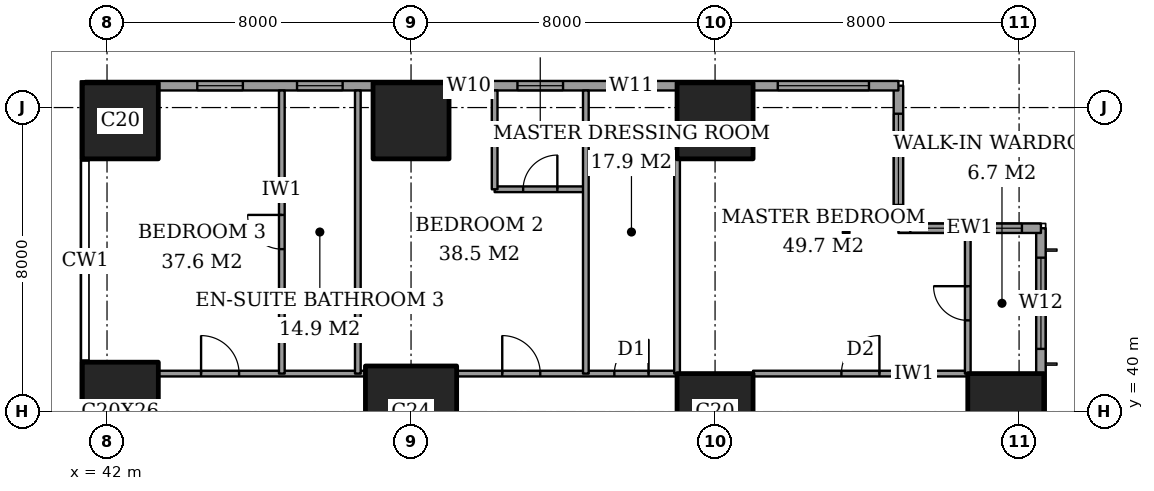
"""IFC4 building model, lengths in metres.
Left out: names, types, materials, properties, quantities, classifications, styles, units other than length and angle.
Written with IfcOpenShell. Run it as: python <this file> out.ifc"""

import sys

from ifc_helpers import new_model, si_unit, direction, frame, frame_2d, origin, origin_2d, place, context, subcontext, project, spatial, rectangle, extrude, element, fill, save


model = new_model("IFC4")
c1 = context("Model", 3, precision=1e-05, world=origin(), true_north=direction((0.0, 1.0)))
c2 = subcontext(c1, "Body", "Model", "MODEL_VIEW")
j1 = project(units=[si_unit("LENGTHUNIT", "METRE"), si_unit("PLANEANGLEUNIT", "RADIAN")], contexts=[c1])
p1 = place(None, origin())
s1 = spatial("IfcSite", under=j1, at=p1, CompositionType="ELEMENT")
p2 = place(p1, origin())
s2 = spatial("IfcBuilding", under=s1, at=p2, CompositionType="ELEMENT")
p3 = place(p2, frame((0.0, 0.0, 107.0)))
s3 = spatial("IfcBuildingStorey", under=s2, at=p3, CompositionType="ELEMENT", Elevation=107.0)
p4 = place(p3, frame((42.35, 40.0, 0.0), z_axis=(0.0, 0.0, 1.0), x_axis=(1.0, 0.0, 0.0)))
e1 = element("IfcColumn", 1, at=p4, inside=s3, PredefinedType="COLUMN", context=c2, shape_type="SweptSolid", body=[
    extrude(rectangle(XDim=2.0, YDim=2.6, at=origin_2d()), origin(), (0.0, 0.0, 1.0), 3.6),
])
p5 = place(p3, frame((42.35, 47.65, 0.0), z_axis=(0.0, 0.0, 1.0), x_axis=(1.0, 0.0, 0.0)))
e2 = element("IfcColumn", 2, at=p5, inside=s3, PredefinedType="COLUMN", context=c2, shape_type="SweptSolid", body=[
    extrude(rectangle(XDim=2.0, YDim=2.0, at=origin_2d()), origin(), (0.0, 0.0, 1.0), 3.6),
])
p6 = place(p3, frame((50.0, 40.0, 0.0), z_axis=(0.0, 0.0, 1.0), x_axis=(1.0, 0.0, 0.0)))
e3 = element("IfcColumn", 3, at=p6, inside=s3, PredefinedType="COLUMN", context=c2, shape_type="SweptSolid", body=[
    extrude(rectangle(XDim=2.4, YDim=2.4, at=origin_2d()), origin(), (0.0, 0.0, 1.0), 3.6),
])
for number, where, z_axis, x_axis in (
    (4, (50.0, 47.65, 0.0), (0.0, 0.0, 1.0), (1.0, 0.0, 0.0)),
    (5, (58.0, 40.0, 0.0), (0.0, 0.0, 1.0), (1.0, 0.0, 0.0)),
    (6, (58.0, 47.65, 0.0), (0.0, 0.0, 1.0), (1.0, 0.0, 0.0)),
    (7, (65.65, 40.0, 0.0), (0.0, 0.0, 1.0), (1.0, 0.0, 0.0)),
):
    element("IfcColumn", number, at=place(p3, frame(where, z_axis=z_axis, x_axis=x_axis)), inside=s3, PredefinedType="COLUMN", context=c2, shape_type="SweptSolid", body=[
        extrude(rectangle(XDim=2.0, YDim=2.0, at=origin_2d()), origin(), (0.0, 0.0, 1.0), 3.6),
    ])
p7 = place(p3, frame((66.575, 3.175, 0.0), z_axis=(0.0, 0.0, 1.0), x_axis=(0.0, 1.0, 0.0)))
e8 = element("IfcWall", 8, at=p7, inside=s3, PredefinedType="SOLIDWALL", context=c2, shape_type="SweptSolid", body=[
    extrude(rectangle(XDim=41.65, YDim=0.25, at=frame_2d((20.825, 0.0))), origin(), (0.0, 0.0, 1.0), 3.6),
])
p8 = place(p7, frame((0.775, 0.0, 0.4)))
e9 = element("IfcOpeningElement", 9, at=p8, cuts=e8, PredefinedType="OPENING", context=c2, shape_type="SweptSolid", body=[
    extrude(rectangle(XDim=2.4, YDim=2.2, at=frame_2d((1.2, 1.1))), frame((0.0, 0.135, 0.0), z_axis=(0.0, -1.0, 0.0), x_axis=(1.0, 0.0, 0.0)), (0.0, 0.0, 1.0), 0.27),
])
p9 = place(p7, frame((6.1, 0.0, 0.4)))
e10 = element("IfcOpeningElement", 10, at=p9, cuts=e8, PredefinedType="OPENING", context=c2, shape_type="SweptSolid", body=[
    extrude(rectangle(XDim=1.2, YDim=2.2, at=frame_2d((0.6, 1.1))), frame((0.0, 0.135, 0.0), z_axis=(0.0, -1.0, 0.0), x_axis=(1.0, 0.0, 0.0)), (0.0, 0.0, 1.0), 0.27),
])
p10 = place(p7, frame((8.275, 0.0, 0.4)))
e11 = element("IfcOpeningElement", 11, at=p10, cuts=e8, PredefinedType="OPENING", context=c2, shape_type="SweptSolid", body=[
    extrude(rectangle(XDim=2.4, YDim=2.2, at=frame_2d((1.2, 1.1))), frame((0.0, 0.135, 0.0), z_axis=(0.0, -1.0, 0.0), x_axis=(1.0, 0.0, 0.0)), (0.0, 0.0, 1.0), 0.27),
])
p11 = place(p7, frame((15.775, 0.0, 0.4)))
e12 = element("IfcOpeningElement", 12, at=p11, cuts=e8, PredefinedType="OPENING", context=c2, shape_type="SweptSolid", body=[
    extrude(rectangle(XDim=2.4, YDim=2.2, at=frame_2d((1.2, 1.1))), frame((0.0, 0.135, 0.0), z_axis=(0.0, -1.0, 0.0), x_axis=(1.0, 0.0, 0.0)), (0.0, 0.0, 1.0), 0.27),
])
p12 = place(p7, frame((23.475, 0.0, 0.4)))
e13 = element("IfcOpeningElement", 13, at=p12, cuts=e8, PredefinedType="OPENING", context=c2, shape_type="SweptSolid", body=[
    extrude(rectangle(XDim=2.4, YDim=2.2, at=frame_2d((1.2, 1.1))), frame((0.0, 0.135, 0.0), z_axis=(0.0, -1.0, 0.0), x_axis=(1.0, 0.0, 0.0)), (0.0, 0.0, 1.0), 0.27),
])
p13 = place(p7, frame((30.975, 0.0, 0.4)))
e14 = element("IfcOpeningElement", 14, at=p13, cuts=e8, PredefinedType="OPENING", context=c2, shape_type="SweptSolid", body=[
    extrude(rectangle(XDim=2.4, YDim=2.2, at=frame_2d((1.2, 1.1))), frame((0.0, 0.135, 0.0), z_axis=(0.0, -1.0, 0.0), x_axis=(1.0, 0.0, 0.0)), (0.0, 0.0, 1.0), 0.27),
])
p14 = place(p7, frame((34.5, 0.0, 0.4)))
e15 = element("IfcOpeningElement", 15, at=p14, cuts=e8, PredefinedType="OPENING", context=c2, shape_type="SweptSolid", body=[
    extrude(rectangle(XDim=1.2, YDim=2.2, at=frame_2d((0.6, 1.1))), frame((0.0, 0.135, 0.0), z_axis=(0.0, -1.0, 0.0), x_axis=(1.0, 0.0, 0.0)), (0.0, 0.0, 1.0), 0.27),
])
p15 = place(p7, frame((38.475, 0.0, 0.4)))
e16 = element("IfcOpeningElement", 16, at=p15, cuts=e8, PredefinedType="OPENING", context=c2, shape_type="SweptSolid", body=[
    extrude(rectangle(XDim=2.4, YDim=2.2, at=frame_2d((1.2, 1.1))), frame((0.0, 0.135, 0.0), z_axis=(0.0, -1.0, 0.0), x_axis=(1.0, 0.0, 0.0)), (0.0, 0.0, 1.0), 0.27),
])
p16 = place(p3, frame((66.575, 44.825, 0.0), z_axis=(0.0, 0.0, 1.0), x_axis=(-1.0, 0.0, 0.0)))
e17 = element("IfcWall", 17, at=p16, inside=s3, PredefinedType="SOLIDWALL", context=c2, shape_type="SweptSolid", body=[
    extrude(rectangle(XDim=3.75, YDim=0.25, at=frame_2d((1.875, 0.0))), origin(), (0.0, 0.0, 1.0), 3.6),
])
p17 = place(p16, frame((0.5, 0.0, 0.4)))
e18 = element("IfcOpeningElement", 18, at=p17, cuts=e17, PredefinedType="OPENING", context=c2, shape_type="SweptSolid", body=[
    extrude(rectangle(XDim=1.2, YDim=2.2, at=frame_2d((0.6, 1.1))), frame((0.0, 0.135, 0.0), z_axis=(0.0, -1.0, 0.0), x_axis=(1.0, 0.0, 0.0)), (0.0, 0.0, 1.0), 0.27),
])
p18 = place(p16, frame((2.238, 0.0, 0.4)))
e19 = element("IfcOpeningElement", 19, at=p18, cuts=e17, PredefinedType="OPENING", context=c2, shape_type="SweptSolid", body=[
    extrude(rectangle(XDim=1.2, YDim=2.2, at=frame_2d((0.6, 1.1))), frame((0.0, 0.135, 0.0), z_axis=(0.0, -1.0, 0.0), x_axis=(1.0, 0.0, 0.0)), (0.0, 0.0, 1.0), 0.27),
])
p19 = place(p3, frame((62.825, 44.825, 0.0), z_axis=(0.0, 0.0, 1.0), x_axis=(0.0, 1.0, 0.0)))
e20 = element("IfcWall", 20, at=p19, inside=s3, PredefinedType="SOLIDWALL", context=c2, shape_type="SweptSolid", body=[
    extrude(rectangle(XDim=3.75, YDim=0.25, at=frame_2d((1.875, 0.0))), origin(), (0.0, 0.0, 1.0), 3.6),
])
p20 = place(p19, frame((0.613, 0.0, 0.4)))
e21 = element("IfcOpeningElement", 21, at=p20, cuts=e20, PredefinedType="OPENING", context=c2, shape_type="SweptSolid", body=[
    extrude(rectangle(XDim=2.4, YDim=2.2, at=frame_2d((1.2, 1.1))), frame((0.0, 0.135, 0.0), z_axis=(0.0, -1.0, 0.0), x_axis=(1.0, 0.0, 0.0)), (0.0, 0.0, 1.0), 0.27),
])
p21 = place(p3, frame((62.825, 48.575, 0.0), z_axis=(0.0, 0.0, 1.0), x_axis=(-1.0, 0.0, 0.0)))
e22 = element("IfcWall", 22, at=p21, inside=s3, PredefinedType="SOLIDWALL", context=c2, shape_type="SweptSolid", body=[
    extrude(rectangle(XDim=21.4, YDim=0.25, at=frame_2d((10.7, 0.0))), origin(), (0.0, 0.0, 1.0), 3.6),
])
p22 = place(p21, frame((0.775, 0.0, 0.4)))
e23 = element("IfcOpeningElement", 23, at=p22, cuts=e22, PredefinedType="OPENING", context=c2, shape_type="SweptSolid", body=[
    extrude(rectangle(XDim=2.4, YDim=2.2, at=frame_2d((1.2, 1.1))), frame((0.0, 0.135, 0.0), z_axis=(0.0, -1.0, 0.0), x_axis=(1.0, 0.0, 0.0)), (0.0, 0.0, 1.0), 0.27),
])
p23 = place(p21, frame((6.425, 0.0, 0.4)))
e24 = element("IfcOpeningElement", 24, at=p23, cuts=e22, PredefinedType="OPENING", context=c2, shape_type="SweptSolid", body=[
    extrude(rectangle(XDim=1.2, YDim=2.2, at=frame_2d((0.6, 1.1))), frame((0.0, 0.135, 0.0), z_axis=(0.0, -1.0, 0.0), x_axis=(1.0, 0.0, 0.0)), (0.0, 0.0, 1.0), 0.27),
])
p24 = place(p21, frame((8.825, 0.0, 0.4)))
e25 = element("IfcOpeningElement", 25, at=p24, cuts=e22, PredefinedType="OPENING", context=c2, shape_type="SweptSolid", body=[
    extrude(rectangle(XDim=1.2, YDim=2.2, at=frame_2d((0.6, 1.1))), frame((0.0, 0.135, 0.0), z_axis=(0.0, -1.0, 0.0), x_axis=(1.0, 0.0, 0.0)), (0.0, 0.0, 1.0), 0.27),
])
p25 = place(p21, frame((11.0, 0.0, 0.4)))
e26 = element("IfcOpeningElement", 26, at=p25, cuts=e22, PredefinedType="OPENING", context=c2, shape_type="SweptSolid", body=[
    extrude(rectangle(XDim=0.6, YDim=2.2, at=frame_2d((0.3, 1.1))), frame((0.0, 0.135, 0.0), z_axis=(0.0, -1.0, 0.0), x_axis=(1.0, 0.0, 0.0)), (0.0, 0.0, 1.0), 0.27),
])
p26 = place(p21, frame((14.625, 0.0, 0.4)))
e27 = element("IfcOpeningElement", 27, at=p26, cuts=e22, PredefinedType="OPENING", context=c2, shape_type="SweptSolid", body=[
    extrude(rectangle(XDim=1.2, YDim=2.2, at=frame_2d((0.6, 1.1))), frame((0.0, 0.135, 0.0), z_axis=(0.0, -1.0, 0.0), x_axis=(1.0, 0.0, 0.0)), (0.0, 0.0, 1.0), 0.27),
])
p27 = place(p21, frame((17.25, 0.0, 0.4)))
e28 = element("IfcOpeningElement", 28, at=p27, cuts=e22, PredefinedType="OPENING", context=c2, shape_type="SweptSolid", body=[
    extrude(rectangle(XDim=1.2, YDim=2.2, at=frame_2d((0.6, 1.1))), frame((0.0, 0.135, 0.0), z_axis=(0.0, -1.0, 0.0), x_axis=(1.0, 0.0, 0.0)), (0.0, 0.0, 1.0), 0.27),
])
p28 = place(p3, frame((43.35, 41.0, 0.0), z_axis=(0.0, 0.0, 1.0), x_axis=(1.0, 0.0, 0.0)))
e29 = element("IfcWall", 29, at=p28, inside=s3, PredefinedType="PARTITIONING", context=c2, shape_type="SweptSolid", body=[
    extrude(rectangle(XDim=5.45, YDim=0.15, at=frame_2d((2.725, 0.0))), origin(), (0.0, 0.0, 1.0), 3.35),
])
p29 = place(p28, frame((1.125, 0.0, 0.0)))
e30 = element("IfcOpeningElement", 30, at=p29, cuts=e29, PredefinedType="OPENING", context=c2, shape_type="SweptSolid", body=[
    extrude(rectangle(XDim=1.0, YDim=2.1, at=frame_2d((0.5, 1.05))), frame((0.0, 0.085, 0.0), z_axis=(0.0, -1.0, 0.0), x_axis=(1.0, 0.0, 0.0)), (0.0, 0.0, 1.0), 0.17),
])
p30 = place(p3, frame((51.2, 41.0, 0.0), z_axis=(0.0, 0.0, 1.0), x_axis=(1.0, 0.0, 0.0)))
e31 = element("IfcWall", 31, at=p30, inside=s3, PredefinedType="PARTITIONING", context=c2, shape_type="SweptSolid", body=[
    extrude(rectangle(XDim=5.8, YDim=0.15, at=frame_2d((2.9, 0.0))), origin(), (0.0, 0.0, 1.0), 3.35),
])
p31 = place(p30, frame((4.15, 0.0, 0.0)))
e32 = element("IfcOpeningElement", 32, at=p31, cuts=e31, PredefinedType="OPENING", context=c2, shape_type="SweptSolid", body=[
    extrude(rectangle(XDim=0.9, YDim=2.1, at=frame_2d((0.45, 1.05))), frame((0.0, 0.085, 0.0), z_axis=(0.0, -1.0, 0.0), x_axis=(1.0, 0.0, 0.0)), (0.0, 0.0, 1.0), 0.17),
])
p32 = place(p30, frame((1.2, 0.0, 0.0)))
e33 = element("IfcOpeningElement", 33, at=p32, cuts=e31, PredefinedType="OPENING", context=c2, shape_type="SweptSolid", body=[
    extrude(rectangle(XDim=1.0, YDim=2.1, at=frame_2d((0.5, 1.05))), frame((0.0, 0.085, 0.0), z_axis=(0.0, -1.0, 0.0), x_axis=(1.0, 0.0, 0.0)), (0.0, 0.0, 1.0), 0.17),
])
p33 = place(p3, frame((59.0, 41.0, 0.0), z_axis=(0.0, 0.0, 1.0), x_axis=(1.0, 0.0, 0.0)))
e34 = element("IfcWall", 34, at=p33, inside=s3, PredefinedType="PARTITIONING", context=c2, shape_type="SweptSolid", body=[
    extrude(rectangle(XDim=5.65, YDim=0.15, at=frame_2d((2.825, 0.0))), origin(), (0.0, 0.0, 1.0), 3.35),
])
p34 = place(p33, frame((2.325, 0.0, 0.0)))
e35 = element("IfcOpeningElement", 35, at=p34, cuts=e34, PredefinedType="OPENING", context=c2, shape_type="SweptSolid", body=[
    extrude(rectangle(XDim=1.0, YDim=2.1, at=frame_2d((0.5, 1.05))), frame((0.0, 0.085, 0.0), z_axis=(0.0, -1.0, 0.0), x_axis=(1.0, 0.0, 0.0)), (0.0, 0.0, 1.0), 0.17),
])
p35 = place(p3, frame((52.2, 45.85, 0.0), z_axis=(0.0, 0.0, 1.0), x_axis=(1.0, 0.0, 0.0)))
e36 = element("IfcWall", 36, at=p35, inside=s3, PredefinedType="PARTITIONING", context=c2, shape_type="SweptSolid", body=[
    extrude(rectangle(XDim=2.4, YDim=0.15, at=frame_2d((1.2, 0.0))), origin(), (0.0, 0.0, 1.0), 3.35),
])
p36 = place(p35, frame((0.75, 0.0, 0.0)))
e37 = element("IfcOpeningElement", 37, at=p36, cuts=e36, PredefinedType="OPENING", context=c2, shape_type="SweptSolid", body=[
    extrude(rectangle(XDim=0.9, YDim=2.1, at=frame_2d((0.45, 1.05))), frame((0.0, 0.085, 0.0), z_axis=(0.0, -1.0, 0.0), x_axis=(1.0, 0.0, 0.0)), (0.0, 0.0, 1.0), 0.17),
])
p37 = place(p3, frame((46.6, 41.0, 0.0), z_axis=(0.0, 0.0, 1.0), x_axis=(0.0, 1.0, 0.0)))
e38 = element("IfcWall", 38, at=p37, inside=s3, PredefinedType="PARTITIONING", context=c2, shape_type="SweptSolid", body=[
    extrude(rectangle(XDim=7.45, YDim=0.15, at=frame_2d((3.725, 0.0))), origin(), (0.0, 0.0, 1.0), 3.35),
])
p38 = place(p37, frame((3.275, 0.0, 0.0)))
e39 = element("IfcOpeningElement", 39, at=p38, cuts=e38, PredefinedType="OPENING", context=c2, shape_type="SweptSolid", body=[
    extrude(rectangle(XDim=0.9, YDim=2.1, at=frame_2d((0.45, 1.05))), frame((0.0, 0.085, 0.0), z_axis=(0.0, -1.0, 0.0), x_axis=(1.0, 0.0, 0.0)), (0.0, 0.0, 1.0), 0.17),
])
p39 = place(p3, frame((48.6, 41.0, 0.0), z_axis=(0.0, 0.0, 1.0), x_axis=(0.0, 1.0, 0.0)))
e40 = element("IfcWall", 40, at=p39, inside=s3, PredefinedType="PARTITIONING", context=c2, shape_type="SweptSolid", body=[
    extrude(rectangle(XDim=7.45, YDim=0.15, at=frame_2d((3.725, 0.0))), origin(), (0.0, 0.0, 1.0), 3.35),
])
p40 = place(p3, frame((52.2, 45.85, 0.0), z_axis=(0.0, 0.0, 1.0), x_axis=(0.0, 1.0, 0.0)))
e41 = element("IfcWall", 41, at=p40, inside=s3, PredefinedType="PARTITIONING", context=c2, shape_type="SweptSolid", body=[
    extrude(rectangle(XDim=2.6, YDim=0.15, at=frame_2d((1.3, 0.0))), origin(), (0.0, 0.0, 1.0), 3.35),
])
p41 = place(p3, frame((54.6, 41.0, 0.0), z_axis=(0.0, 0.0, 1.0), x_axis=(0.0, 1.0, 0.0)))
e42 = element("IfcWall", 42, at=p41, inside=s3, PredefinedType="PARTITIONING", context=c2, shape_type="SweptSolid", body=[
    extrude(rectangle(XDim=7.45, YDim=0.15, at=frame_2d((3.725, 0.0))), origin(), (0.0, 0.0, 1.0), 3.35),
])
p42 = place(p3, frame((57.0, 41.0, 0.0), z_axis=(0.0, 0.0, 1.0), x_axis=(0.0, 1.0, 0.0)))
e43 = element("IfcWall", 43, at=p42, inside=s3, PredefinedType="PARTITIONING", context=c2, shape_type="SweptSolid", body=[
    extrude(rectangle(XDim=5.65, YDim=0.15, at=frame_2d((2.825, 0.0))), origin(), (0.0, 0.0, 1.0), 3.35),
])
p43 = place(p3, frame((64.65, 41.0, 0.0), z_axis=(0.0, 0.0, 1.0), x_axis=(0.0, 1.0, 0.0)))
e44 = element("IfcWall", 44, at=p43, inside=s3, PredefinedType="PARTITIONING", context=c2, shape_type="SweptSolid", body=[
    extrude(rectangle(XDim=3.7, YDim=0.15, at=frame_2d((1.85, 0.0))), origin(), (0.0, 0.0, 1.0), 3.35),
])
p44 = place(p43, frame((1.4, 0.0, 0.0)))
e45 = element("IfcOpeningElement", 45, at=p44, cuts=e44, PredefinedType="OPENING", context=c2, shape_type="SweptSolid", body=[
    extrude(rectangle(XDim=0.9, YDim=2.1, at=frame_2d((0.45, 1.05))), frame((0.0, 0.085, 0.0), z_axis=(0.0, -1.0, 0.0), x_axis=(1.0, 0.0, 0.0)), (0.0, 0.0, 1.0), 0.17),
])
p45 = place(p15, origin())
e46 = element("IfcWindow", 46, at=p45, inside=s3, PartitioningType="SINGLE_PANEL", PredefinedType="WINDOW", context=c2, shape_type="SweptSolid", body=[
    extrude(rectangle(XDim=2.4, YDim=2.2, at=frame_2d((1.2, 1.1))), frame((0.0, 0.03, 0.0), z_axis=(0.0, -1.0, 0.0), x_axis=(1.0, 0.0, 0.0)), (0.0, 0.0, 1.0), 0.06),
])
fill(e16, e46)
p46 = place(p17, origin())
e47 = element("IfcWindow", 47, at=p46, inside=s3, PartitioningType="SINGLE_PANEL", PredefinedType="WINDOW", context=c2, shape_type="SweptSolid", body=[
    extrude(rectangle(XDim=1.2, YDim=2.2, at=frame_2d((0.6, 1.1))), frame((0.0, 0.03, 0.0), z_axis=(0.0, -1.0, 0.0), x_axis=(1.0, 0.0, 0.0)), (0.0, 0.0, 1.0), 0.06),
])
fill(e18, e47)
p47 = place(p18, origin())
e48 = element("IfcWindow", 48, at=p47, inside=s3, PartitioningType="SINGLE_PANEL", PredefinedType="WINDOW", context=c2, shape_type="SweptSolid", body=[
    extrude(rectangle(XDim=1.2, YDim=2.2, at=frame_2d((0.6, 1.1))), frame((0.0, 0.03, 0.0), z_axis=(0.0, -1.0, 0.0), x_axis=(1.0, 0.0, 0.0)), (0.0, 0.0, 1.0), 0.06),
])
fill(e19, e48)
p48 = place(p20, origin())
e49 = element("IfcWindow", 49, at=p48, inside=s3, PartitioningType="SINGLE_PANEL", PredefinedType="WINDOW", context=c2, shape_type="SweptSolid", body=[
    extrude(rectangle(XDim=2.4, YDim=2.2, at=frame_2d((1.2, 1.1))), frame((0.0, 0.03, 0.0), z_axis=(0.0, -1.0, 0.0), x_axis=(1.0, 0.0, 0.0)), (0.0, 0.0, 1.0), 0.06),
])
fill(e21, e49)
p49 = place(p22, origin())
e50 = element("IfcWindow", 50, at=p49, inside=s3, PartitioningType="SINGLE_PANEL", PredefinedType="WINDOW", context=c2, shape_type="SweptSolid", body=[
    extrude(rectangle(XDim=2.4, YDim=2.2, at=frame_2d((1.2, 1.1))), frame((0.0, 0.03, 0.0), z_axis=(0.0, -1.0, 0.0), x_axis=(1.0, 0.0, 0.0)), (0.0, 0.0, 1.0), 0.06),
])
fill(e23, e50)
p50 = place(p23, origin())
e51 = element("IfcWindow", 51, at=p50, inside=s3, PartitioningType="SINGLE_PANEL", PredefinedType="WINDOW", context=c2, shape_type="SweptSolid", body=[
    extrude(rectangle(XDim=1.2, YDim=2.2, at=frame_2d((0.6, 1.1))), frame((0.0, 0.03, 0.0), z_axis=(0.0, -1.0, 0.0), x_axis=(1.0, 0.0, 0.0)), (0.0, 0.0, 1.0), 0.06),
])
fill(e24, e51)
p51 = place(p24, origin())
e52 = element("IfcWindow", 52, at=p51, inside=s3, PartitioningType="SINGLE_PANEL", PredefinedType="WINDOW", context=c2, shape_type="SweptSolid", body=[
    extrude(rectangle(XDim=1.2, YDim=2.2, at=frame_2d((0.6, 1.1))), frame((0.0, 0.03, 0.0), z_axis=(0.0, -1.0, 0.0), x_axis=(1.0, 0.0, 0.0)), (0.0, 0.0, 1.0), 0.06),
])
fill(e25, e52)
p52 = place(p25, origin())
e53 = element("IfcWindow", 53, at=p52, inside=s3, PartitioningType="SINGLE_PANEL", PredefinedType="WINDOW", context=c2, shape_type="SweptSolid", body=[
    extrude(rectangle(XDim=0.6, YDim=2.2, at=frame_2d((0.3, 1.1))), frame((0.0, 0.03, 0.0), z_axis=(0.0, -1.0, 0.0), x_axis=(1.0, 0.0, 0.0)), (0.0, 0.0, 1.0), 0.06),
])
fill(e26, e53)
p53 = place(p26, origin())
e54 = element("IfcWindow", 54, at=p53, inside=s3, PartitioningType="SINGLE_PANEL", PredefinedType="WINDOW", context=c2, shape_type="SweptSolid", body=[
    extrude(rectangle(XDim=1.2, YDim=2.2, at=frame_2d((0.6, 1.1))), frame((0.0, 0.03, 0.0), z_axis=(0.0, -1.0, 0.0), x_axis=(1.0, 0.0, 0.0)), (0.0, 0.0, 1.0), 0.06),
])
fill(e27, e54)
p54 = place(p27, origin())
e55 = element("IfcWindow", 55, at=p54, inside=s3, PartitioningType="SINGLE_PANEL", PredefinedType="WINDOW", context=c2, shape_type="SweptSolid", body=[
    extrude(rectangle(XDim=1.2, YDim=2.2, at=frame_2d((0.6, 1.1))), frame((0.0, 0.03, 0.0), z_axis=(0.0, -1.0, 0.0), x_axis=(1.0, 0.0, 0.0)), (0.0, 0.0, 1.0), 0.06),
])
fill(e28, e55)
p55 = place(p44, origin())
e56 = element("IfcDoor", 56, at=p55, inside=s3, OperationType="SINGLE_SWING_LEFT", PredefinedType="DOOR", context=c2, shape_type="SweptSolid", body=[
    extrude(rectangle(XDim=0.9, YDim=2.1, at=frame_2d((0.45, 1.05))), frame((0.0, 0.025, 0.0), z_axis=(0.0, -1.0, 0.0), x_axis=(1.0, 0.0, 0.0)), (0.0, 0.0, 1.0), 0.05),
])
fill(e45, e56)
p56 = place(p34, origin())
e57 = element("IfcDoor", 57, at=p56, inside=s3, OperationType="SINGLE_SWING_LEFT", PredefinedType="DOOR", context=c2, shape_type="SweptSolid", body=[
    extrude(rectangle(XDim=1.0, YDim=2.1, at=frame_2d((0.5, 1.05))), frame((0.0, 0.025, 0.0), z_axis=(0.0, -1.0, 0.0), x_axis=(1.0, 0.0, 0.0)), (0.0, 0.0, 1.0), 0.05),
])
fill(e35, e57)
p57 = place(p31, origin())
e58 = element("IfcDoor", 58, at=p57, inside=s3, OperationType="SINGLE_SWING_LEFT", PredefinedType="DOOR", context=c2, shape_type="SweptSolid", body=[
    extrude(rectangle(XDim=0.9, YDim=2.1, at=frame_2d((0.45, 1.05))), frame((0.0, 0.025, 0.0), z_axis=(0.0, -1.0, 0.0), x_axis=(1.0, 0.0, 0.0)), (0.0, 0.0, 1.0), 0.05),
])
fill(e32, e58)
p58 = place(p36, origin())
e59 = element("IfcDoor", 59, at=p58, inside=s3, OperationType="SINGLE_SWING_LEFT", PredefinedType="DOOR", context=c2, shape_type="SweptSolid", body=[
    extrude(rectangle(XDim=0.9, YDim=2.1, at=frame_2d((0.45, 1.05))), frame((0.0, 0.025, 0.0), z_axis=(0.0, -1.0, 0.0), x_axis=(1.0, 0.0, 0.0)), (0.0, 0.0, 1.0), 0.05),
])
fill(e37, e59)
p59 = place(p32, origin())
e60 = element("IfcDoor", 60, at=p59, inside=s3, OperationType="SINGLE_SWING_RIGHT", PredefinedType="DOOR", context=c2, shape_type="SweptSolid", body=[
    extrude(rectangle(XDim=1.0, YDim=2.1, at=frame_2d((0.5, 1.05))), frame((0.0, 0.025, 0.0), z_axis=(0.0, -1.0, 0.0), x_axis=(1.0, 0.0, 0.0)), (0.0, 0.0, 1.0), 0.05),
])
fill(e33, e60)
p60 = place(p38, origin())
e61 = element("IfcDoor", 61, at=p60, inside=s3, OperationType="SINGLE_SWING_LEFT", PredefinedType="DOOR", context=c2, shape_type="SweptSolid", body=[
    extrude(rectangle(XDim=0.9, YDim=2.1, at=frame_2d((0.45, 1.05))), frame((0.0, 0.025, 0.0), z_axis=(0.0, -1.0, 0.0), x_axis=(1.0, 0.0, 0.0)), (0.0, 0.0, 1.0), 0.05),
])
fill(e39, e61)
p61 = place(p29, origin())
e62 = element("IfcDoor", 62, at=p61, inside=s3, OperationType="SINGLE_SWING_RIGHT", PredefinedType="DOOR", context=c2, shape_type="SweptSolid", body=[
    extrude(rectangle(XDim=1.0, YDim=2.1, at=frame_2d((0.5, 1.05))), frame((0.0, 0.025, 0.0), z_axis=(0.0, -1.0, 0.0), x_axis=(1.0, 0.0, 0.0)), (0.0, 0.0, 1.0), 0.05),
])
fill(e30, e62)
save(model, sys.argv[1])
